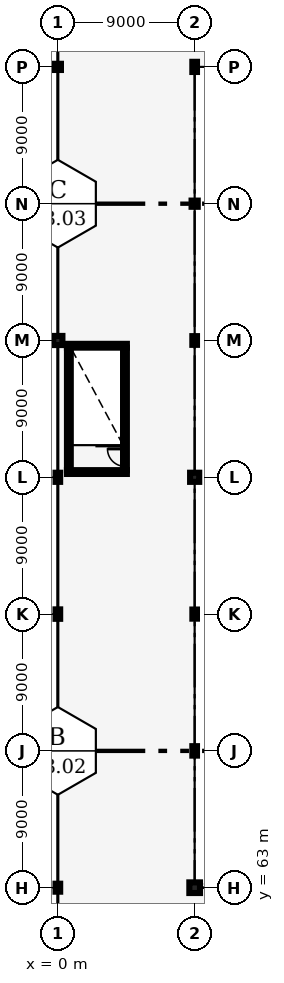
"""IFC4 building model, lengths in metres.
Left out: names, types, materials, properties, quantities, classifications, styles, units other than length and angle.
Written with IfcOpenShell. Run it as: python <this file> out.ifc"""

import sys

from ifc_helpers import new_model, si_unit, direction, frame, frame_2d, origin, origin_2d, place, context, subcontext, project, spatial, rectangle, hollow_circle, i_section, extrude, element, fill, save


model = new_model("IFC4")
c1 = context("Model", 3, precision=1e-05, world=origin(), true_north=direction((0.0, 1.0)))
c2 = subcontext(c1, "Body", "Model", "MODEL_VIEW")
j1 = project(units=[si_unit("LENGTHUNIT", "METRE"), si_unit("PLANEANGLEUNIT", "RADIAN")], contexts=[c1])
p1 = place(None, origin())
s1 = spatial("IfcSite", under=j1, at=p1, CompositionType="ELEMENT")
p2 = place(p1, origin())
s2 = spatial("IfcBuilding", under=s1, at=p2, CompositionType="ELEMENT")
p3 = place(p2, frame((0.0, 0.0, 6.0)))
s3 = spatial("IfcBuildingStorey", under=s2, at=p3, CompositionType="ELEMENT", Elevation=6.0)
p4 = place(p3, frame((0.0, 63.0, 0.0), z_axis=(0.0, 0.0, 1.0), x_axis=(1.0, 0.0, 0.0)))
e1 = element("IfcColumn", 1, at=p4, inside=s3, PredefinedType="COLUMN", context=c2, shape_type="SweptSolid", body=[
    extrude(i_section(OverallWidth=0.306, OverallDepth=0.524, WebThickness=0.021, FlangeThickness=0.04, FilletRadius=0.027, at=origin_2d()), origin(), (0.0, 0.0, 1.0), 6.0),
])
p5 = place(p3, frame((0.0, 72.0, 0.0), z_axis=(0.0, 0.0, 1.0), x_axis=(1.0, 0.0, 0.0)))
e2 = element("IfcColumn", 2, at=p5, inside=s3, PredefinedType="COLUMN", context=c2, shape_type="SweptSolid", body=[
    extrude(rectangle(XDim=0.7, YDim=0.7, at=origin_2d()), origin(), (0.0, 0.0, 1.0), 6.0),
])
p6 = place(p3, frame((0.0, 81.0, 0.0), z_axis=(0.0, 0.0, 1.0), x_axis=(1.0, 0.0, 0.0)))
e3 = element("IfcColumn", 3, at=p6, inside=s3, PredefinedType="COLUMN", context=c2, shape_type="SweptSolid", body=[
    extrude(i_section(OverallWidth=0.305, OverallDepth=0.62, WebThickness=0.021, FlangeThickness=0.04, FilletRadius=0.027, at=origin_2d()), origin(), (0.0, 0.0, 1.0), 6.0),
])
p7 = place(p3, frame((0.0, 90.0, 0.0), z_axis=(0.0, 0.0, 1.0), x_axis=(1.0, 0.0, 0.0)))
e4 = element("IfcColumn", 4, at=p7, inside=s3, PredefinedType="COLUMN", context=c2, shape_type="SweptSolid", body=[
    extrude(i_section(OverallWidth=0.3, OverallDepth=0.6, WebThickness=0.015, FlangeThickness=0.03, FilletRadius=0.027, at=origin_2d()), origin(), (0.0, 0.0, 1.0), 6.0),
])
p8 = place(p3, frame((0.0, 99.0, 0.0), z_axis=(0.0, 0.0, 1.0), x_axis=(1.0, 0.0, 0.0)))
e5 = element("IfcColumn", 5, at=p8, inside=s3, PredefinedType="COLUMN", context=c2, shape_type="SweptSolid", body=[
    extrude(rectangle(XDim=0.6, YDim=0.6, at=origin_2d()), origin(), (0.0, 0.0, 1.0), 6.0),
])
p9 = place(p3, frame((0.0, 108.0, 0.0), z_axis=(0.0, 0.0, 1.0), x_axis=(1.0, 0.0, 0.0)))
e6 = element("IfcColumn", 6, at=p9, inside=s3, PredefinedType="COLUMN", context=c2, shape_type="SweptSolid", body=[
    extrude(i_section(OverallWidth=0.306, OverallDepth=0.572, WebThickness=0.021, FlangeThickness=0.04, FilletRadius=0.027, at=origin_2d()), origin(), (0.0, 0.0, 1.0), 6.0),
])
p10 = place(p3, frame((0.0, 117.0, 0.0), z_axis=(0.0, 0.0, 1.0), x_axis=(1.0, 0.0, 0.0)))
e7 = element("IfcColumn", 7, at=p10, inside=s3, PredefinedType="COLUMN", context=c2, shape_type="SweptSolid", body=[
    extrude(hollow_circle(Radius=0.203, WallThickness=0.016, at=origin_2d()), origin(), (0.0, 0.0, 1.0), 6.0),
])
p11 = place(p3, frame((9.0, 63.0, 0.0), z_axis=(0.0, 0.0, 1.0), x_axis=(1.0, 0.0, 0.0)))
e8 = element("IfcColumn", 8, at=p11, inside=s3, PredefinedType="COLUMN", context=c2, shape_type="SweptSolid", body=[
    extrude(rectangle(XDim=0.7, YDim=0.7, at=origin_2d()), origin(), (0.0, 0.0, 1.0), 6.0),
])
p12 = place(p3, frame((9.0, 72.0, 0.0), z_axis=(0.0, 0.0, 1.0), x_axis=(1.0, 0.0, 0.0)))
e9 = element("IfcColumn", 9, at=p12, inside=s3, PredefinedType="COLUMN", context=c2, shape_type="SweptSolid", body=[
    extrude(i_section(OverallWidth=0.305, OverallDepth=0.62, WebThickness=0.021, FlangeThickness=0.04, FilletRadius=0.027, at=origin_2d()), origin(), (0.0, 0.0, 1.0), 6.0),
])
p13 = place(p3, frame((9.0, 81.0, 0.0), z_axis=(0.0, 0.0, 1.0), x_axis=(1.0, 0.0, 0.0)))
e10 = element("IfcColumn", 10, at=p13, inside=s3, PredefinedType="COLUMN", context=c2, shape_type="SweptSolid", body=[
    extrude(i_section(OverallWidth=0.3, OverallDepth=0.6, WebThickness=0.015, FlangeThickness=0.03, FilletRadius=0.027, at=origin_2d()), origin(), (0.0, 0.0, 1.0), 6.0),
])
p14 = place(p3, frame((9.0, 90.0, 0.0), z_axis=(0.0, 0.0, 1.0), x_axis=(1.0, 0.0, 0.0)))
e11 = element("IfcColumn", 11, at=p14, inside=s3, PredefinedType="COLUMN", context=c2, shape_type="SweptSolid", body=[
    extrude(rectangle(XDim=0.6, YDim=0.6, at=origin_2d()), origin(), (0.0, 0.0, 1.0), 6.0),
])
p15 = place(p3, frame((9.0, 99.0, 0.0), z_axis=(0.0, 0.0, 1.0), x_axis=(1.0, 0.0, 0.0)))
e12 = element("IfcColumn", 12, at=p15, inside=s3, PredefinedType="COLUMN", context=c2, shape_type="SweptSolid", body=[
    extrude(i_section(OverallWidth=0.306, OverallDepth=0.572, WebThickness=0.021, FlangeThickness=0.04, FilletRadius=0.027, at=origin_2d()), origin(), (0.0, 0.0, 1.0), 6.0),
])
p16 = place(p3, frame((9.0, 108.0, 0.0), z_axis=(0.0, 0.0, 1.0), x_axis=(1.0, 0.0, 0.0)))
e13 = element("IfcColumn", 13, at=p16, inside=s3, PredefinedType="COLUMN", context=c2, shape_type="SweptSolid", body=[
    extrude(hollow_circle(Radius=0.203, WallThickness=0.016, at=origin_2d()), origin(), (0.0, 0.0, 1.0), 6.0),
])
p17 = place(p3, frame((9.0, 117.0, 0.0), z_axis=(0.0, 0.0, 1.0), x_axis=(1.0, 0.0, 0.0)))
e14 = element("IfcColumn", 14, at=p17, inside=s3, PredefinedType="COLUMN", context=c2, shape_type="SweptSolid", body=[
    extrude(i_section(OverallWidth=0.305, OverallDepth=0.668, WebThickness=0.021, FlangeThickness=0.04, FilletRadius=0.027, at=origin_2d()), origin(), (0.0, 0.0, 1.0), 6.0),
])
p18 = place(p3, frame((0.725, 90.47, 0.0), z_axis=(0.0, 0.0, 1.0), x_axis=(0.0, 1.0, 0.0)))
e15 = element("IfcWall", 15, at=p18, inside=s3, PredefinedType="SHEAR", context=c2, shape_type="SweptSolid", body=[
    extrude(rectangle(XDim=8.06, YDim=0.25, at=frame_2d((4.03, 0.0))), origin(), (0.0, 0.0, 1.0), 5.65),
])
p19 = place(p3, frame((4.415, 90.47, 0.0), z_axis=(0.0, 0.0, 1.0), x_axis=(0.0, 1.0, 0.0)))
e16 = element("IfcWall", 16, at=p19, inside=s3, PredefinedType="SHEAR", context=c2, shape_type="SweptSolid", body=[
    extrude(rectangle(XDim=8.06, YDim=0.25, at=frame_2d((4.03, 0.0))), origin(), (0.0, 0.0, 1.0), 5.65),
])
p20 = place(p19, frame((0.25, 0.0, 0.0)))
e17 = element("IfcOpeningElement", 17, at=p20, cuts=e16, PredefinedType="OPENING", context=c2, shape_type="SweptSolid", body=[
    extrude(rectangle(XDim=1.15, YDim=2.15, at=frame_2d((0.575, 1.075))), frame((0.0, 0.135, 0.0), z_axis=(0.0, -1.0, 0.0), x_axis=(1.0, 0.0, 0.0)), (0.0, 0.0, 1.0), 0.27),
])
for number, where, z_axis, x_axis in (
    (18, (0.6, 90.345, 0.0), (0.0, 0.0, 1.0), (1.0, 0.0, 0.0)),
    (19, (0.6, 98.655, 0.0), (0.0, 0.0, 1.0), (1.0, 0.0, 0.0)),
):
    element("IfcWall", number, at=place(p3, frame(where, z_axis=z_axis, x_axis=x_axis)), inside=s3, PredefinedType="SHEAR", context=c2, shape_type="SweptSolid", body=[
        extrude(rectangle(XDim=3.94, YDim=0.25, at=frame_2d((1.97, 0.0))), origin(), (0.0, 0.0, 1.0), 5.65),
    ])
p21 = place(p20, origin())
e20 = element("IfcDoor", 20, at=p21, inside=s3, OperationType="SINGLE_SWING_RIGHT", PredefinedType="DOOR", context=c2, shape_type="SweptSolid", body=[
    extrude(rectangle(XDim=1.15, YDim=2.15, at=frame_2d((0.575, 1.075))), frame((0.0, 0.025, 0.0), z_axis=(0.0, -1.0, 0.0), x_axis=(1.0, 0.0, 0.0)), (0.0, 0.0, 1.0), 0.05),
])
fill(e17, e20)
save(model, sys.argv[1])
